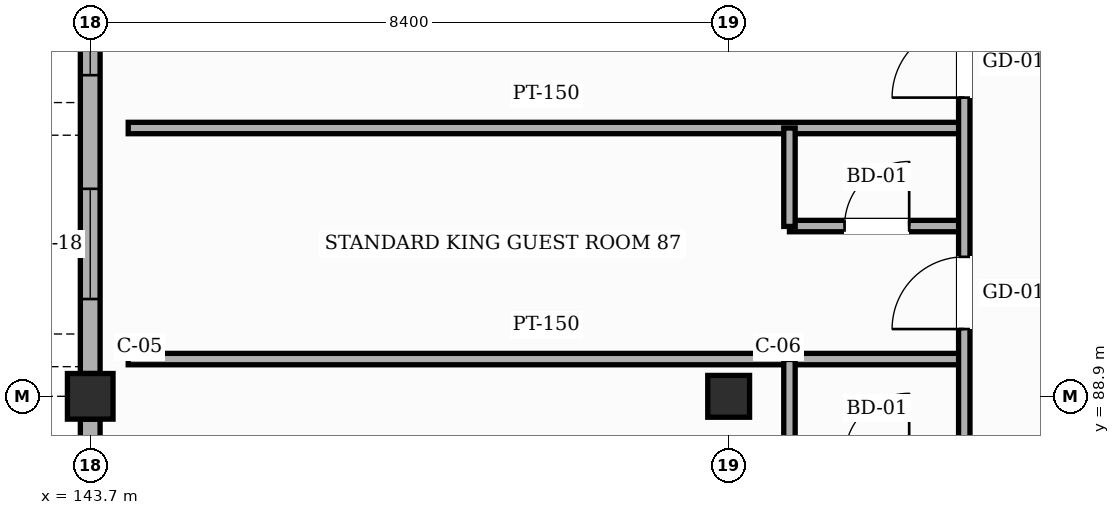
"""IFC4 building model, lengths in metres.
Left out: names, types, materials, properties, quantities, classifications, styles, units other than length and angle.
Written with IfcOpenShell. Run it as: python <this file> out.ifc"""

import sys

from ifc_helpers import new_model, si_unit, direction, frame, frame_2d, origin, origin_2d, place, context, subcontext, project, spatial, rectangle, hollow_rectangle, extrude, element, fill, save


model = new_model("IFC4")
c1 = context("Model", 3, precision=1e-05, world=origin(), true_north=direction((0.0, 1.0)))
c2 = subcontext(c1, "Body", "Model", "MODEL_VIEW")
j1 = project(units=[si_unit("LENGTHUNIT", "METRE"), si_unit("PLANEANGLEUNIT", "RADIAN")], contexts=[c1])
p1 = place(None, origin())
s1 = spatial("IfcSite", under=j1, at=p1, CompositionType="ELEMENT")
p2 = place(p1, origin())
s2 = spatial("IfcBuilding", under=s1, at=p2, CompositionType="ELEMENT")
p3 = place(p2, frame((0.0, 0.0, 24.6)))
s3 = spatial("IfcBuildingStorey", under=s2, at=p3, CompositionType="ELEMENT", Elevation=24.6)
p4 = place(p3, frame((143.7, 88.9, 0.0), z_axis=(0.0, 0.0, 1.0), x_axis=(1.0, 0.0, 0.0)))
e1 = element("IfcColumn", 1, at=p4, inside=s3, PredefinedType="COLUMN", context=c2, shape_type="SweptSolid", body=[
    extrude(hollow_rectangle(XDim=0.6, YDim=0.6, WallThickness=0.025, InnerFilletRadius=0.025, OuterFilletRadius=0.05, at=origin_2d()), origin(), (0.0, 0.0, 1.0), 3.6),
])
p5 = place(p3, frame((152.1, 88.9, 0.0), z_axis=(0.0, 0.0, 1.0), x_axis=(1.0, 0.0, 0.0)))
e2 = element("IfcColumn", 2, at=p5, inside=s3, PredefinedType="COLUMN", context=c2, shape_type="SweptSolid", body=[
    extrude(hollow_rectangle(XDim=0.55, YDim=0.55, WallThickness=0.022, InnerFilletRadius=0.022, OuterFilletRadius=0.044, at=origin_2d()), origin(), (0.0, 0.0, 1.0), 3.6),
])
p6 = place(p3, frame((143.7, 81.2, 0.0), z_axis=(0.0, 0.0, 1.0), x_axis=(0.0, 1.0, 0.0)))
e3 = element("IfcWall", 3, at=p6, inside=s3, PredefinedType="SOLIDWALL", context=c2, shape_type="SweptSolid", body=[
    extrude(rectangle(XDim=7.4, YDim=0.26, at=frame_2d((3.7, 0.0))), origin(), (0.0, 0.0, 1.0), 2.805),
])
p7 = place(p6, frame((0.625, 0.0, 0.85)))
e4 = element("IfcOpeningElement", 4, at=p7, cuts=e3, PredefinedType="OPENING", context=c2, shape_type="SweptSolid", body=[
    extrude(rectangle(XDim=0.85, YDim=1.35, at=frame_2d((0.425, 0.675))), frame((0.0, 0.14, 0.0), z_axis=(0.0, -1.0, 0.0), x_axis=(1.0, 0.0, 0.0)), (0.0, 0.0, 1.0), 0.28),
])
p8 = place(p6, frame((2.495, 0.0, 0.85)))
e5 = element("IfcOpeningElement", 5, at=p8, cuts=e3, PredefinedType="OPENING", context=c2, shape_type="SweptSolid", body=[
    extrude(rectangle(XDim=2.25, YDim=1.5, at=frame_2d((1.125, 0.75))), frame((0.0, 0.14, 0.0), z_axis=(0.0, -1.0, 0.0), x_axis=(1.0, 0.0, 0.0)), (0.0, 0.0, 1.0), 0.28),
])
p9 = place(p6, frame((5.645, 0.0, 0.85)))
e6 = element("IfcOpeningElement", 6, at=p9, cuts=e3, PredefinedType="OPENING", context=c2, shape_type="SweptSolid", body=[
    extrude(rectangle(XDim=1.25, YDim=1.65, at=frame_2d((0.625, 0.825))), frame((0.0, 0.14, 0.0), z_axis=(0.0, -1.0, 0.0), x_axis=(1.0, 0.0, 0.0)), (0.0, 0.0, 1.0), 0.28),
])
p10 = place(p3, frame((143.7, 89.2, 0.0), z_axis=(0.0, 0.0, 1.0), x_axis=(0.0, 1.0, 0.0)))
e7 = element("IfcWall", 7, at=p10, inside=s3, PredefinedType="SOLIDWALL", context=c2, shape_type="SweptSolid", body=[
    extrude(rectangle(XDim=7.4, YDim=0.26, at=frame_2d((3.7, 0.0))), origin(), (0.0, 0.0, 1.0), 2.805),
])
p11 = place(p10, frame((0.98, 0.0, 0.85)))
e8 = element("IfcOpeningElement", 8, at=p11, cuts=e7, PredefinedType="OPENING", context=c2, shape_type="SweptSolid", body=[
    extrude(rectangle(XDim=1.45, YDim=1.65, at=frame_2d((0.725, 0.825))), frame((0.0, 0.14, 0.0), z_axis=(0.0, -1.0, 0.0), x_axis=(1.0, 0.0, 0.0)), (0.0, 0.0, 1.0), 0.28),
])
p12 = place(p10, frame((3.925, 0.0, 0.85)))
e9 = element("IfcOpeningElement", 9, at=p12, cuts=e7, PredefinedType="OPENING", context=c2, shape_type="SweptSolid", body=[
    extrude(rectangle(XDim=1.65, YDim=1.65, at=frame_2d((0.825, 0.825))), frame((0.0, 0.14, 0.0), z_axis=(0.0, -1.0, 0.0), x_axis=(1.0, 0.0, 0.0)), (0.0, 0.0, 1.0), 0.28),
])
p13 = place(p3, frame((144.2, 89.39, 0.0), z_axis=(0.0, 0.0, 1.0), x_axis=(1.0, 0.0, 0.0)))
e10 = element("IfcWall", 10, at=p13, inside=s3, PredefinedType="PARTITIONING", context=c2, shape_type="SweptSolid", body=[
    extrude(rectangle(XDim=11.0, YDim=0.15, at=frame_2d((5.5, 0.0))), origin(), (0.0, 0.0, 1.0), 3.365),
])
p14 = place(p3, frame((152.9, 91.14, 0.0), z_axis=(0.0, 0.0, 1.0), x_axis=(1.0, 0.0, 0.0)))
e11 = element("IfcWall", 11, at=p14, inside=s3, PredefinedType="PARTITIONING", context=c2, shape_type="SweptSolid", body=[
    extrude(rectangle(XDim=2.3, YDim=0.15, at=frame_2d((1.15, 0.0))), origin(), (0.0, 0.0, 1.0), 3.365),
])
p15 = place(p14, frame((0.725, 0.0, 0.0)))
e12 = element("IfcOpeningElement", 12, at=p15, cuts=e11, PredefinedType="OPENING", context=c2, shape_type="SweptSolid", body=[
    extrude(rectangle(XDim=0.85, YDim=2.1, at=frame_2d((0.425, 1.05))), frame((0.0, 0.085, 0.0), z_axis=(0.0, -1.0, 0.0), x_axis=(1.0, 0.0, 0.0)), (0.0, 0.0, 1.0), 0.17),
])
p16 = place(p3, frame((144.2, 92.43, 0.0), z_axis=(0.0, 0.0, 1.0), x_axis=(1.0, 0.0, 0.0)))
e13 = element("IfcWall", 13, at=p16, inside=s3, PredefinedType="PARTITIONING", context=c2, shape_type="SweptSolid", body=[
    extrude(rectangle(XDim=11.0, YDim=0.15, at=frame_2d((5.5, 0.0))), origin(), (0.0, 0.0, 1.0), 3.365),
])
p17 = place(p3, frame((152.9, 88.095, 0.0), z_axis=(0.0, 0.0, 1.0), x_axis=(0.0, 1.0, 0.0)))
e14 = element("IfcWall", 14, at=p17, inside=s3, PredefinedType="PARTITIONING", context=c2, shape_type="SweptSolid", body=[
    extrude(rectangle(XDim=1.29, YDim=0.15, at=frame_2d((0.645, 0.0))), origin(), (0.0, 0.0, 1.0), 3.365),
])
p18 = place(p3, frame((152.9, 91.135, 0.0), z_axis=(0.0, 0.0, 1.0), x_axis=(0.0, 1.0, 0.0)))
e15 = element("IfcWall", 15, at=p18, inside=s3, PredefinedType="PARTITIONING", context=c2, shape_type="SweptSolid", body=[
    extrude(rectangle(XDim=1.295, YDim=0.15, at=frame_2d((0.647, 0.0))), origin(), (0.0, 0.0, 1.0), 3.365),
])
p19 = place(p3, frame((155.2, 62.0, 0.0), z_axis=(0.0, 0.0, 1.0), x_axis=(0.0, 1.0, 0.0)))
e16 = element("IfcWall", 16, at=p19, inside=s3, PredefinedType="PARTITIONING", context=c2, shape_type="SweptSolid", body=[
    extrude(rectangle(XDim=42.6, YDim=0.15, at=frame_2d((21.3, 0.0))), origin(), (0.0, 0.0, 1.0), 3.365),
])
p20 = place(p19, frame((0.4, 0.0, 0.0)))
e17 = element("IfcOpeningElement", 17, at=p20, cuts=e16, PredefinedType="OPENING", context=c2, shape_type="SweptSolid", body=[
    extrude(rectangle(XDim=0.95, YDim=2.15, at=frame_2d((0.475, 1.075))), frame((0.0, 0.085, 0.0), z_axis=(0.0, -1.0, 0.0), x_axis=(1.0, 0.0, 0.0)), (0.0, 0.0, 1.0), 0.17),
])
p21 = place(p19, frame((3.445, 0.0, 0.0)))
e18 = element("IfcOpeningElement", 18, at=p21, cuts=e16, PredefinedType="OPENING", context=c2, shape_type="SweptSolid", body=[
    extrude(rectangle(XDim=0.95, YDim=2.15, at=frame_2d((0.475, 1.075))), frame((0.0, 0.085, 0.0), z_axis=(0.0, -1.0, 0.0), x_axis=(1.0, 0.0, 0.0)), (0.0, 0.0, 1.0), 0.17),
])
p22 = place(p19, frame((6.485, 0.0, 0.0)))
e19 = element("IfcOpeningElement", 19, at=p22, cuts=e16, PredefinedType="OPENING", context=c2, shape_type="SweptSolid", body=[
    extrude(rectangle(XDim=0.95, YDim=2.15, at=frame_2d((0.475, 1.075))), frame((0.0, 0.085, 0.0), z_axis=(0.0, -1.0, 0.0), x_axis=(1.0, 0.0, 0.0)), (0.0, 0.0, 1.0), 0.17),
])
p23 = place(p19, frame((9.53, 0.0, 0.0)))
e20 = element("IfcOpeningElement", 20, at=p23, cuts=e16, PredefinedType="OPENING", context=c2, shape_type="SweptSolid", body=[
    extrude(rectangle(XDim=0.95, YDim=2.15, at=frame_2d((0.475, 1.075))), frame((0.0, 0.085, 0.0), z_axis=(0.0, -1.0, 0.0), x_axis=(1.0, 0.0, 0.0)), (0.0, 0.0, 1.0), 0.17),
])
p24 = place(p19, frame((12.57, 0.0, 0.0)))
e21 = element("IfcOpeningElement", 21, at=p24, cuts=e16, PredefinedType="OPENING", context=c2, shape_type="SweptSolid", body=[
    extrude(rectangle(XDim=0.95, YDim=2.15, at=frame_2d((0.475, 1.075))), frame((0.0, 0.085, 0.0), z_axis=(0.0, -1.0, 0.0), x_axis=(1.0, 0.0, 0.0)), (0.0, 0.0, 1.0), 0.17),
])
p25 = place(p19, frame((15.615, 0.0, 0.0)))
e22 = element("IfcOpeningElement", 22, at=p25, cuts=e16, PredefinedType="OPENING", context=c2, shape_type="SweptSolid", body=[
    extrude(rectangle(XDim=0.95, YDim=2.15, at=frame_2d((0.475, 1.075))), frame((0.0, 0.085, 0.0), z_axis=(0.0, -1.0, 0.0), x_axis=(1.0, 0.0, 0.0)), (0.0, 0.0, 1.0), 0.17),
])
p26 = place(p19, frame((18.655, 0.0, 0.0)))
e23 = element("IfcOpeningElement", 23, at=p26, cuts=e16, PredefinedType="OPENING", context=c2, shape_type="SweptSolid", body=[
    extrude(rectangle(XDim=0.95, YDim=2.15, at=frame_2d((0.475, 1.075))), frame((0.0, 0.085, 0.0), z_axis=(0.0, -1.0, 0.0), x_axis=(1.0, 0.0, 0.0)), (0.0, 0.0, 1.0), 0.17),
])
p27 = place(p19, frame((21.7, 0.0, 0.0)))
e24 = element("IfcOpeningElement", 24, at=p27, cuts=e16, PredefinedType="OPENING", context=c2, shape_type="SweptSolid", body=[
    extrude(rectangle(XDim=0.95, YDim=2.15, at=frame_2d((0.475, 1.075))), frame((0.0, 0.085, 0.0), z_axis=(0.0, -1.0, 0.0), x_axis=(1.0, 0.0, 0.0)), (0.0, 0.0, 1.0), 0.17),
])
p28 = place(p19, frame((24.745, 0.0, 0.0)))
e25 = element("IfcOpeningElement", 25, at=p28, cuts=e16, PredefinedType="OPENING", context=c2, shape_type="SweptSolid", body=[
    extrude(rectangle(XDim=0.95, YDim=2.15, at=frame_2d((0.475, 1.075))), frame((0.0, 0.085, 0.0), z_axis=(0.0, -1.0, 0.0), x_axis=(1.0, 0.0, 0.0)), (0.0, 0.0, 1.0), 0.17),
])
p29 = place(p19, frame((27.785, 0.0, 0.0)))
e26 = element("IfcOpeningElement", 26, at=p29, cuts=e16, PredefinedType="OPENING", context=c2, shape_type="SweptSolid", body=[
    extrude(rectangle(XDim=0.95, YDim=2.15, at=frame_2d((0.475, 1.075))), frame((0.0, 0.085, 0.0), z_axis=(0.0, -1.0, 0.0), x_axis=(1.0, 0.0, 0.0)), (0.0, 0.0, 1.0), 0.17),
])
p30 = place(p19, frame((30.83, 0.0, 0.0)))
e27 = element("IfcOpeningElement", 27, at=p30, cuts=e16, PredefinedType="OPENING", context=c2, shape_type="SweptSolid", body=[
    extrude(rectangle(XDim=0.95, YDim=2.15, at=frame_2d((0.475, 1.075))), frame((0.0, 0.085, 0.0), z_axis=(0.0, -1.0, 0.0), x_axis=(1.0, 0.0, 0.0)), (0.0, 0.0, 1.0), 0.17),
])
p31 = place(p19, frame((33.87, 0.0, 0.0)))
e28 = element("IfcOpeningElement", 28, at=p31, cuts=e16, PredefinedType="OPENING", context=c2, shape_type="SweptSolid", body=[
    extrude(rectangle(XDim=0.95, YDim=2.15, at=frame_2d((0.475, 1.075))), frame((0.0, 0.085, 0.0), z_axis=(0.0, -1.0, 0.0), x_axis=(1.0, 0.0, 0.0)), (0.0, 0.0, 1.0), 0.17),
])
p32 = place(p19, frame((36.915, 0.0, 0.0)))
e29 = element("IfcOpeningElement", 29, at=p32, cuts=e16, PredefinedType="OPENING", context=c2, shape_type="SweptSolid", body=[
    extrude(rectangle(XDim=0.95, YDim=2.15, at=frame_2d((0.475, 1.075))), frame((0.0, 0.085, 0.0), z_axis=(0.0, -1.0, 0.0), x_axis=(1.0, 0.0, 0.0)), (0.0, 0.0, 1.0), 0.17),
])
p33 = place(p19, frame((39.955, 0.0, 0.0)))
e30 = element("IfcOpeningElement", 30, at=p33, cuts=e16, PredefinedType="OPENING", context=c2, shape_type="SweptSolid", body=[
    extrude(rectangle(XDim=0.95, YDim=2.15, at=frame_2d((0.475, 1.075))), frame((0.0, 0.085, 0.0), z_axis=(0.0, -1.0, 0.0), x_axis=(1.0, 0.0, 0.0)), (0.0, 0.0, 1.0), 0.17),
])
p34 = place(p11, origin())
e31 = element("IfcWindow", 31, at=p34, inside=s3, PartitioningType="SINGLE_PANEL", PredefinedType="WINDOW", context=c2, shape_type="SweptSolid", body=[
    extrude(rectangle(XDim=1.45, YDim=1.65, at=frame_2d((0.725, 0.825))), frame((0.0, 0.03, 0.0), z_axis=(0.0, -1.0, 0.0), x_axis=(1.0, 0.0, 0.0)), (0.0, 0.0, 1.0), 0.06),
])
fill(e8, e31)
p35 = place(p12, origin())
e32 = element("IfcWindow", 32, at=p35, inside=s3, PartitioningType="SINGLE_PANEL", PredefinedType="WINDOW", context=c2, shape_type="SweptSolid", body=[
    extrude(rectangle(XDim=1.65, YDim=1.65, at=frame_2d((0.825, 0.825))), frame((0.0, 0.03, 0.0), z_axis=(0.0, -1.0, 0.0), x_axis=(1.0, 0.0, 0.0)), (0.0, 0.0, 1.0), 0.06),
])
fill(e9, e32)
p36 = place(p29, origin())
e33 = element("IfcDoor", 33, at=p36, inside=s3, OperationType="SINGLE_SWING_LEFT", PredefinedType="DOOR", context=c2, shape_type="SweptSolid", body=[
    extrude(rectangle(XDim=0.95, YDim=2.15, at=frame_2d((0.475, 1.075))), frame((0.0, 0.025, 0.0), z_axis=(0.0, -1.0, 0.0), x_axis=(1.0, 0.0, 0.0)), (0.0, 0.0, 1.0), 0.05),
])
fill(e26, e33)
p37 = place(p15, origin())
e34 = element("IfcDoor", 34, at=p37, inside=s3, OperationType="SINGLE_SWING_RIGHT", PredefinedType="DOOR", context=c2, shape_type="SweptSolid", body=[
    extrude(rectangle(XDim=0.85, YDim=2.1, at=frame_2d((0.425, 1.05))), frame((0.0, 0.025, 0.0), z_axis=(0.0, -1.0, 0.0), x_axis=(1.0, 0.0, 0.0)), (0.0, 0.0, 1.0), 0.05),
])
fill(e12, e34)
p38 = place(p30, origin())
e35 = element("IfcDoor", 35, at=p38, inside=s3, OperationType="SINGLE_SWING_LEFT", PredefinedType="DOOR", context=c2, shape_type="SweptSolid", body=[
    extrude(rectangle(XDim=0.95, YDim=2.15, at=frame_2d((0.475, 1.075))), frame((0.0, 0.025, 0.0), z_axis=(0.0, -1.0, 0.0), x_axis=(1.0, 0.0, 0.0)), (0.0, 0.0, 1.0), 0.05),
])
fill(e27, e35)
save(model, sys.argv[1])
